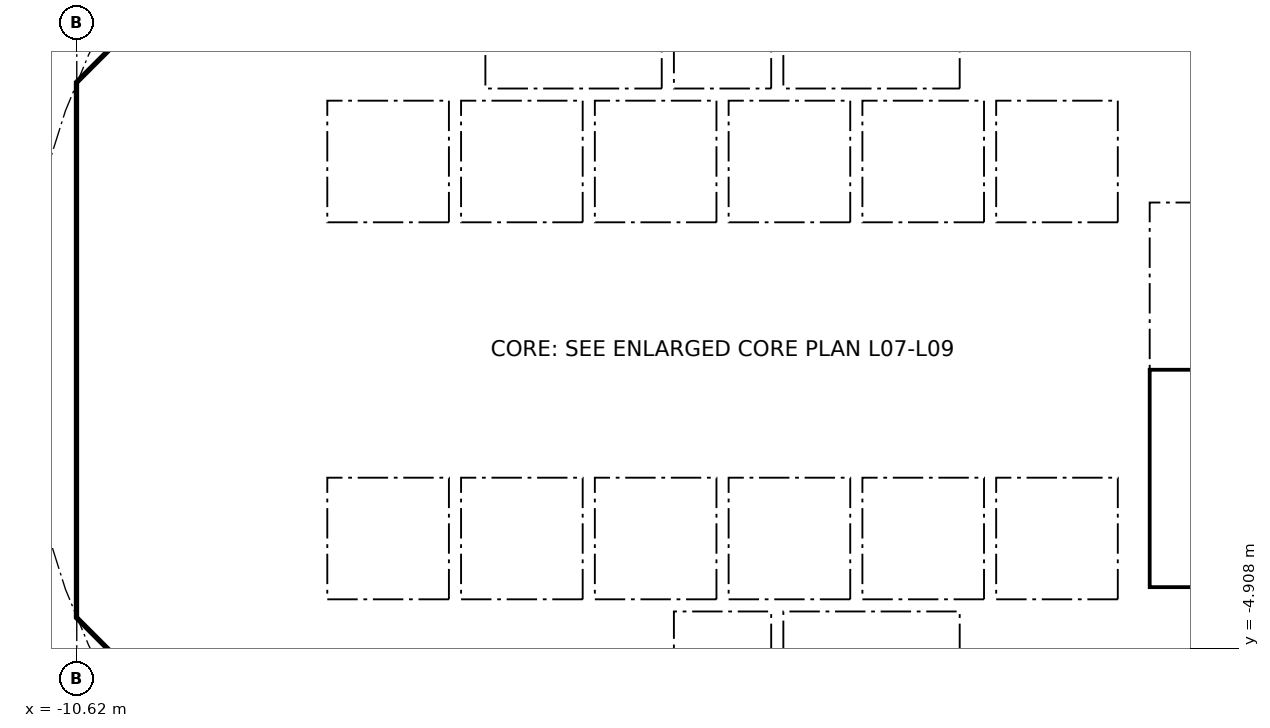
"""IFC4 building model, lengths in metres.
Left out: names, types, materials, properties, quantities, classifications, styles, units other than length and angle.
Written with IfcOpenShell. Run it as: python <this file> out.ifc"""

import sys

from ifc_helpers import new_model, si_unit, direction, frame, frame_2d, origin, place, context, subcontext, project, spatial, polyline, rectangle, outline, extrude, element, fill, save


model = new_model("IFC4")
c1 = context("Model", 3, precision=1e-05, world=origin(), true_north=direction((0.0, 1.0)))
c2 = subcontext(c1, "Body", "Model", "MODEL_VIEW")
j1 = project(units=[si_unit("LENGTHUNIT", "METRE"), si_unit("PLANEANGLEUNIT", "RADIAN")], contexts=[c1])
p1 = place(None, origin())
s1 = spatial("IfcSite", under=j1, at=p1, CompositionType="ELEMENT")
p2 = place(p1, origin())
s2 = spatial("IfcBuilding", under=s1, at=p2, CompositionType="ELEMENT")
p3 = place(p2, frame((0.0, 0.0, 34.4)))
s3 = spatial("IfcBuildingStorey", under=s2, at=p3, CompositionType="ELEMENT", Elevation=34.4)
p4 = place(p3, frame((9.988, 4.613, 0.0), z_axis=(0.0, 0.0, 1.0), x_axis=(-0.707106781187, 0.707106781187, 0.0)))
e1 = element("IfcWall", 1, at=p4, inside=s3, PredefinedType="SHEAR", context=c2, shape_type="SweptSolid", body=[
    extrude(rectangle(XDim=7.602, YDim=0.6, at=frame_2d((3.801, 0.0))), origin(), (0.0, 0.0, 1.0), 3.44),
])
p5 = place(p4, frame((3.201, 0.0, 0.0)))
e2 = element("IfcOpeningElement", 2, at=p5, cuts=e1, PredefinedType="OPENING", context=c2, shape_type="SweptSolid", body=[
    extrude(rectangle(XDim=1.2, YDim=2.1, at=frame_2d((0.6, 1.05))), frame((0.0, 0.31, 0.0), z_axis=(0.0, -1.0, 0.0), x_axis=(1.0, 0.0, 0.0)), (0.0, 0.0, 1.0), 0.62),
])
p6 = place(p3, frame((-4.613, 9.988, 0.0), z_axis=(0.0, 0.0, 1.0), x_axis=(-0.707106781187, -0.707106781187, 0.0)))
e3 = element("IfcWall", 3, at=p6, inside=s3, PredefinedType="SHEAR", context=c2, shape_type="SweptSolid", body=[
    extrude(rectangle(XDim=7.602, YDim=0.6, at=frame_2d((3.801, 0.0))), origin(), (0.0, 0.0, 1.0), 3.44),
])
p7 = place(p6, frame((0.351, 0.0, 0.0)))
e4 = element("IfcOpeningElement", 4, at=p7, cuts=e3, PredefinedType="OPENING", context=c2, shape_type="SweptSolid", body=[
    extrude(rectangle(XDim=1.1, YDim=2.1, at=frame_2d((0.55, 1.05))), frame((0.0, 0.31, 0.0), z_axis=(0.0, -1.0, 0.0), x_axis=(1.0, 0.0, 0.0)), (0.0, 0.0, 1.0), 0.62),
])
p8 = place(p3, frame((-10.325, 3.801, 0.0), z_axis=(0.0, 0.0, 1.0), x_axis=(0.0, -1.0, 0.0)))
e5 = element("IfcWall", 5, at=p8, inside=s3, PredefinedType="SHEAR", context=c2, shape_type="SweptSolid", body=[
    extrude(rectangle(XDim=7.602, YDim=0.6, at=frame_2d((3.801, 0.0))), origin(), (0.0, 0.0, 1.0), 3.44),
])
p9 = place(p8, frame((0.651, 0.0, 0.0)))
e6 = element("IfcOpeningElement", 6, at=p9, cuts=e5, PredefinedType="OPENING", context=c2, shape_type="SweptSolid", body=[
    extrude(rectangle(XDim=1.5, YDim=2.1, at=frame_2d((0.75, 1.05))), frame((0.0, 0.31, 0.0), z_axis=(0.0, -1.0, 0.0), x_axis=(1.0, 0.0, 0.0)), (0.0, 0.0, 1.0), 0.62),
])
p10 = place(p8, frame((5.451, 0.0, 0.0)))
e7 = element("IfcOpeningElement", 7, at=p10, cuts=e5, PredefinedType="OPENING", context=c2, shape_type="SweptSolid", body=[
    extrude(rectangle(XDim=1.5, YDim=2.1, at=frame_2d((0.75, 1.05))), frame((0.0, 0.31, 0.0), z_axis=(0.0, -1.0, 0.0), x_axis=(1.0, 0.0, 0.0)), (0.0, 0.0, 1.0), 0.62),
])
p11 = place(p3, frame((-9.988, -4.613, 0.0), z_axis=(0.0, 0.0, 1.0), x_axis=(0.707106781187, -0.707106781187, 0.0)))
e8 = element("IfcWall", 8, at=p11, inside=s3, PredefinedType="SHEAR", context=c2, shape_type="SweptSolid", body=[
    extrude(rectangle(XDim=7.602, YDim=0.6, at=frame_2d((3.801, 0.0))), origin(), (0.0, 0.0, 1.0), 3.44),
])
p12 = place(p11, frame((6.151, 0.0, 0.0)))
e9 = element("IfcOpeningElement", 9, at=p12, cuts=e8, PredefinedType="OPENING", context=c2, shape_type="SweptSolid", body=[
    extrude(rectangle(XDim=1.1, YDim=2.1, at=frame_2d((0.55, 1.05))), frame((0.0, 0.31, 0.0), z_axis=(0.0, -1.0, 0.0), x_axis=(1.0, 0.0, 0.0)), (0.0, 0.0, 1.0), 0.62),
])
p13 = place(p3, frame((4.613, -9.988, 0.0), z_axis=(0.0, 0.0, 1.0), x_axis=(0.707106781187, 0.707106781187, 0.0)))
e10 = element("IfcWall", 10, at=p13, inside=s3, PredefinedType="SHEAR", context=c2, shape_type="SweptSolid", body=[
    extrude(rectangle(XDim=7.602, YDim=0.6, at=frame_2d((3.801, 0.0))), origin(), (0.0, 0.0, 1.0), 3.44),
])
p14 = place(p13, frame((3.201, 0.0, 0.0)))
e11 = element("IfcOpeningElement", 11, at=p14, cuts=e10, PredefinedType="OPENING", context=c2, shape_type="SweptSolid", body=[
    extrude(rectangle(XDim=1.2, YDim=2.1, at=frame_2d((0.6, 1.05))), frame((0.0, 0.31, 0.0), z_axis=(0.0, -1.0, 0.0), x_axis=(1.0, 0.0, 0.0)), (0.0, 0.0, 1.0), 0.62),
])
p15 = place(p3, frame((-6.2, 4.3, 0.0), z_axis=(0.0, 0.0, 1.0), x_axis=(0.0, 1.0, 0.0)))
e12 = element("IfcWall", 12, at=p15, inside=s3, PredefinedType="PARTITIONING", context=c2, shape_type="SweptSolid", body=[
    extrude(rectangle(XDim=3.527, YDim=0.15, at=frame_2d((1.763, 0.0))), origin(), (0.0, 0.0, 1.0), 3.44),
])
p16 = place(p15, frame((0.262, 0.0, 0.0)))
e13 = element("IfcOpeningElement", 13, at=p16, cuts=e12, PredefinedType="OPENING", context=c2, shape_type="SweptSolid", body=[
    extrude(rectangle(XDim=0.9, YDim=2.1, at=frame_2d((0.45, 1.05))), frame((0.0, 0.085, 0.0), z_axis=(0.0, -1.0, 0.0), x_axis=(1.0, 0.0, 0.0)), (0.0, 0.0, 1.0), 0.17),
])
p17 = place(p15, frame((2.138, 0.0, 0.0)))
e14 = element("IfcOpeningElement", 14, at=p17, cuts=e12, PredefinedType="OPENING", context=c2, shape_type="SweptSolid", body=[
    extrude(rectangle(XDim=0.9, YDim=2.1, at=frame_2d((0.45, 1.05))), frame((0.0, 0.085, 0.0), z_axis=(0.0, -1.0, 0.0), x_axis=(1.0, 0.0, 0.0)), (0.0, 0.0, 1.0), 0.17),
])
p18 = place(p3, frame((4.0, 4.3, 0.0), z_axis=(0.0, 0.0, 1.0), x_axis=(0.0, 1.0, 0.0)))
e15 = element("IfcWall", 15, at=p18, inside=s3, PredefinedType="SOLIDWALL", context=c2, shape_type="SweptSolid", body=[
    extrude(rectangle(XDim=2.2, YDim=0.2, at=frame_2d((1.1, 0.0))), origin(), (0.0, 0.0, 1.0), 3.44),
])
p19 = place(p18, frame((0.55, 0.0, 0.0)))
e16 = element("IfcOpeningElement", 16, at=p19, cuts=e15, PredefinedType="OPENING", context=c2, shape_type="SweptSolid", body=[
    extrude(rectangle(XDim=1.1, YDim=2.1, at=frame_2d((0.55, 1.05))), frame((0.0, 0.11, 0.0), z_axis=(0.0, -1.0, 0.0), x_axis=(1.0, 0.0, 0.0)), (0.0, 0.0, 1.0), 0.22),
])
p20 = place(p3, frame((-4.0, 4.3, 0.0), z_axis=(0.0, 0.0, 1.0), x_axis=(0.0, 1.0, 0.0)))
e17 = element("IfcWall", 17, at=p20, inside=s3, PredefinedType="SOLIDWALL", context=c2, shape_type="SweptSolid", body=[
    extrude(rectangle(XDim=2.2, YDim=0.2, at=frame_2d((1.1, 0.0))), origin(), (0.0, 0.0, 1.0), 3.44),
])
p21 = place(p20, frame((0.55, 0.0, 0.0)))
e18 = element("IfcOpeningElement", 18, at=p21, cuts=e17, PredefinedType="OPENING", context=c2, shape_type="SweptSolid", body=[
    extrude(rectangle(XDim=1.1, YDim=2.1, at=frame_2d((0.55, 1.05))), frame((0.0, 0.11, 0.0), z_axis=(0.0, -1.0, 0.0), x_axis=(1.0, 0.0, 0.0)), (0.0, 0.0, 1.0), 0.22),
])
p22 = place(p3, frame((-6.7, 2.0, 0.0), z_axis=(0.0, 0.0, 1.0), x_axis=(1.0, 0.0, 0.0)))
e19 = element("IfcWall", 19, at=p22, inside=s3, PredefinedType="SOLIDWALL", context=c2, shape_type="SweptSolid", body=[
    extrude(rectangle(XDim=13.4, YDim=0.2, at=frame_2d((6.7, 0.0))), origin(), (0.0, 0.0, 1.0), 3.44),
])
p23 = place(p22, frame((0.65, 0.0, 0.0)))
e20 = element("IfcOpeningElement", 20, at=p23, cuts=e19, PredefinedType="OPENING", context=c2, shape_type="SweptSolid", body=[
    extrude(rectangle(XDim=1.1, YDim=2.1, at=frame_2d((0.55, 1.05))), frame((0.0, 0.11, 0.0), z_axis=(0.0, -1.0, 0.0), x_axis=(1.0, 0.0, 0.0)), (0.0, 0.0, 1.0), 0.22),
])
p24 = place(p22, frame((2.85, 0.0, 0.0)))
e21 = element("IfcOpeningElement", 21, at=p24, cuts=e19, PredefinedType="OPENING", context=c2, shape_type="SweptSolid", body=[
    extrude(rectangle(XDim=1.1, YDim=2.1, at=frame_2d((0.55, 1.05))), frame((0.0, 0.11, 0.0), z_axis=(0.0, -1.0, 0.0), x_axis=(1.0, 0.0, 0.0)), (0.0, 0.0, 1.0), 0.22),
])
p25 = place(p22, frame((5.05, 0.0, 0.0)))
e22 = element("IfcOpeningElement", 22, at=p25, cuts=e19, PredefinedType="OPENING", context=c2, shape_type="SweptSolid", body=[
    extrude(rectangle(XDim=1.1, YDim=2.1, at=frame_2d((0.55, 1.05))), frame((0.0, 0.11, 0.0), z_axis=(0.0, -1.0, 0.0), x_axis=(1.0, 0.0, 0.0)), (0.0, 0.0, 1.0), 0.22),
])
p26 = place(p3, frame((6.7, 4.0, 0.0), z_axis=(0.0, 0.0, 1.0), x_axis=(1.0, 0.0, 0.0)))
e23 = element("IfcWall", 23, at=p26, inside=s3, PredefinedType="SOLIDWALL", context=c2, shape_type="SweptSolid", body=[
    extrude(rectangle(XDim=3.325, YDim=0.2, at=frame_2d((1.662, 0.0))), origin(), (0.0, 0.0, 1.0), 3.44),
])
p27 = place(p26, frame((1.25, 0.0, 0.0)))
e24 = element("IfcOpeningElement", 24, at=p27, cuts=e23, PredefinedType="OPENING", context=c2, shape_type="SweptSolid", body=[
    extrude(rectangle(XDim=1.1, YDim=2.1, at=frame_2d((0.55, 1.05))), frame((0.0, 0.11, 0.0), z_axis=(0.0, -1.0, 0.0), x_axis=(1.0, 0.0, 0.0)), (0.0, 0.0, 1.0), 0.22),
])
p28 = place(p3, frame((-6.2, -7.827, 0.0), z_axis=(0.0, 0.0, 1.0), x_axis=(0.0, 1.0, 0.0)))
e25 = element("IfcWall", 25, at=p28, inside=s3, PredefinedType="PARTITIONING", context=c2, shape_type="SweptSolid", body=[
    extrude(rectangle(XDim=3.527, YDim=0.15, at=frame_2d((1.763, 0.0))), origin(), (0.0, 0.0, 1.0), 3.44),
])
p29 = place(p28, frame((2.365, 0.0, 0.0)))
e26 = element("IfcOpeningElement", 26, at=p29, cuts=e25, PredefinedType="OPENING", context=c2, shape_type="SweptSolid", body=[
    extrude(rectangle(XDim=0.9, YDim=2.1, at=frame_2d((0.45, 1.05))), frame((0.0, 0.085, 0.0), z_axis=(0.0, -1.0, 0.0), x_axis=(1.0, 0.0, 0.0)), (0.0, 0.0, 1.0), 0.17),
])
p30 = place(p28, frame((0.489, 0.0, 0.0)))
e27 = element("IfcOpeningElement", 27, at=p30, cuts=e25, PredefinedType="OPENING", context=c2, shape_type="SweptSolid", body=[
    extrude(rectangle(XDim=0.9, YDim=2.1, at=frame_2d((0.45, 1.05))), frame((0.0, 0.085, 0.0), z_axis=(0.0, -1.0, 0.0), x_axis=(1.0, 0.0, 0.0)), (0.0, 0.0, 1.0), 0.17),
])
p31 = place(p3, frame((4.0, -6.5, 0.0), z_axis=(0.0, 0.0, 1.0), x_axis=(0.0, 1.0, 0.0)))
e28 = element("IfcWall", 28, at=p31, inside=s3, PredefinedType="SOLIDWALL", context=c2, shape_type="SweptSolid", body=[
    extrude(rectangle(XDim=2.2, YDim=0.2, at=frame_2d((1.1, 0.0))), origin(), (0.0, 0.0, 1.0), 3.44),
])
p32 = place(p31, frame((0.55, 0.0, 0.0)))
e29 = element("IfcOpeningElement", 29, at=p32, cuts=e28, PredefinedType="OPENING", context=c2, shape_type="SweptSolid", body=[
    extrude(rectangle(XDim=1.1, YDim=2.1, at=frame_2d((0.55, 1.05))), frame((0.0, 0.11, 0.0), z_axis=(0.0, -1.0, 0.0), x_axis=(1.0, 0.0, 0.0)), (0.0, 0.0, 1.0), 0.22),
])
p33 = place(p3, frame((-4.0, -6.5, 0.0), z_axis=(0.0, 0.0, 1.0), x_axis=(0.0, 1.0, 0.0)))
e30 = element("IfcWall", 30, at=p33, inside=s3, PredefinedType="SOLIDWALL", context=c2, shape_type="SweptSolid", body=[
    extrude(rectangle(XDim=2.2, YDim=0.2, at=frame_2d((1.1, 0.0))), origin(), (0.0, 0.0, 1.0), 3.44),
])
p34 = place(p33, frame((0.65, 0.0, 0.0)))
e31 = element("IfcOpeningElement", 31, at=p34, cuts=e30, PredefinedType="OPENING", context=c2, shape_type="SweptSolid", body=[
    extrude(rectangle(XDim=0.9, YDim=2.1, at=frame_2d((0.45, 1.05))), frame((0.0, 0.11, 0.0), z_axis=(0.0, -1.0, 0.0), x_axis=(1.0, 0.0, 0.0)), (0.0, 0.0, 1.0), 0.22),
])
p35 = place(p3, frame((-6.7, -2.0, 0.0), z_axis=(0.0, 0.0, 1.0), x_axis=(1.0, 0.0, 0.0)))
e32 = element("IfcWall", 32, at=p35, inside=s3, PredefinedType="SOLIDWALL", context=c2, shape_type="SweptSolid", body=[
    extrude(rectangle(XDim=13.4, YDim=0.2, at=frame_2d((6.7, 0.0))), origin(), (0.0, 0.0, 1.0), 3.44),
])
p36 = place(p35, frame((0.65, 0.0, 0.0)))
e33 = element("IfcOpeningElement", 33, at=p36, cuts=e32, PredefinedType="OPENING", context=c2, shape_type="SweptSolid", body=[
    extrude(rectangle(XDim=1.1, YDim=2.1, at=frame_2d((0.55, 1.05))), frame((0.0, 0.11, 0.0), z_axis=(0.0, -1.0, 0.0), x_axis=(1.0, 0.0, 0.0)), (0.0, 0.0, 1.0), 0.22),
])
p37 = place(p35, frame((2.85, 0.0, 0.0)))
e34 = element("IfcOpeningElement", 34, at=p37, cuts=e32, PredefinedType="OPENING", context=c2, shape_type="SweptSolid", body=[
    extrude(rectangle(XDim=1.1, YDim=2.1, at=frame_2d((0.55, 1.05))), frame((0.0, 0.11, 0.0), z_axis=(0.0, -1.0, 0.0), x_axis=(1.0, 0.0, 0.0)), (0.0, 0.0, 1.0), 0.22),
])
p38 = place(p3, origin())
e35 = element("IfcWall", 35, at=p38, inside=s3, PredefinedType="SHEAR", context=c2, shape_type="SweptSolid", body=[
    extrude(outline(polyline([(-10.625, -3.801), (-10.025, -3.801), (-10.025, -4.152), (-9.776, -4.401), (-10.2, -4.825), (-10.625, -4.401), (-10.625, -3.801)])), origin(), (0.0, 0.0, 1.0), 3.44),
])
p39 = place(p3, origin())
e36 = element("IfcWall", 36, at=p39, inside=s3, PredefinedType="SHEAR", context=c2, shape_type="SweptSolid", body=[
    extrude(outline(polyline([(-10.2, 4.825), (-9.776, 4.401), (-10.025, 4.152), (-10.025, 3.801), (-10.625, 3.801), (-10.625, 4.401), (-10.2, 4.825)])), origin(), (0.0, 0.0, 1.0), 3.44),
])
for number, where, z_axis, x_axis in (
    (37, (-10.025, -4.0, 0.0), (0.0, 0.0, 1.0), (1.0, 0.0, 0.0)),
    (38, (-10.025, 4.0, 0.0), (0.0, 0.0, 1.0), (1.0, 0.0, 0.0)),
):
    element("IfcWall", number, at=place(p3, frame(where, z_axis=z_axis, x_axis=x_axis)), inside=s3, PredefinedType="PARTITIONING", context=c2, shape_type="SweptSolid", body=[
        extrude(rectangle(XDim=3.325, YDim=0.2, at=frame_2d((1.662, 0.0))), origin(), (0.0, 0.0, 1.0), 3.44),
    ])
for number, where, z_axis, x_axis in (
    (39, (-0.9, -6.5, 0.0), (0.0, 0.0, 1.0), (0.0, 1.0, 0.0)),
    (40, (0.9, -6.5, 0.0), (0.0, 0.0, 1.0), (0.0, 1.0, 0.0)),
):
    element("IfcWall", number, at=place(p3, frame(where, z_axis=z_axis, x_axis=x_axis)), inside=s3, PredefinedType="SOLIDWALL", context=c2, shape_type="SweptSolid", body=[
        extrude(rectangle(XDim=2.2, YDim=0.2, at=frame_2d((1.1, 0.0))), origin(), (0.0, 0.0, 1.0), 3.44),
    ])
p40 = place(p3, origin())
e41 = element("IfcWall", 41, at=p40, inside=s3, PredefinedType="SOLIDWALL", context=c2, shape_type="SweptSolid", body=[
    extrude(outline(polyline([(-6.7, -2.1), (-6.5, -2.1), (-6.5, -4.1), (-4.5, -4.1), (-4.5, -2.1), (-4.3, -2.1), (-4.3, -4.1), (-2.3, -4.1), (-2.3, -2.1), (-2.1, -2.1), (-2.1, -4.1), (-0.1, -4.1), (-0.1, -2.1), (0.1, -2.1), (0.1, -4.1), (2.1, -4.1), (2.1, -2.1), (2.3, -2.1), (2.3, -4.1), (4.3, -4.1), (4.3, -2.1), (4.5, -2.1), (4.5, -4.1), (6.5, -4.1), (6.5, -2.1), (6.7, -2.1), (6.7, -4.3), (-6.7, -4.3), (-6.7, -2.1)])), origin(), (0.0, 0.0, 1.0), 3.44),
])
for number, where, z_axis, x_axis in (
    (42, (-0.9, 4.3, 0.0), (0.0, 0.0, 1.0), (0.0, 1.0, 0.0)),
    (43, (0.9, 4.3, 0.0), (0.0, 0.0, 1.0), (0.0, 1.0, 0.0)),
):
    element("IfcWall", number, at=place(p3, frame(where, z_axis=z_axis, x_axis=x_axis)), inside=s3, PredefinedType="SOLIDWALL", context=c2, shape_type="SweptSolid", body=[
        extrude(rectangle(XDim=2.2, YDim=0.2, at=frame_2d((1.1, 0.0))), origin(), (0.0, 0.0, 1.0), 3.44),
    ])
p41 = place(p3, origin())
e44 = element("IfcWall", 44, at=p41, inside=s3, PredefinedType="SOLIDWALL", context=c2, shape_type="SweptSolid", body=[
    extrude(outline(polyline([(-6.5, 2.1), (-6.7, 2.1), (-6.7, 4.3), (6.7, 4.3), (6.7, 2.1), (6.5, 2.1), (6.5, 4.1), (4.5, 4.1), (4.5, 2.1), (4.3, 2.1), (4.3, 4.1), (2.3, 4.1), (2.3, 2.1), (2.1, 2.1), (2.1, 4.1), (0.1, 4.1), (0.1, 2.1), (-0.1, 2.1), (-0.1, 4.1), (-2.1, 4.1), (-2.1, 2.1), (-2.3, 2.1), (-2.3, 4.1), (-4.3, 4.1), (-4.3, 2.1), (-4.5, 2.1), (-4.5, 4.1), (-6.5, 4.1), (-6.5, 2.1)])), origin(), (0.0, 0.0, 1.0), 3.44),
])
p42 = place(p3, origin())
e45 = element("IfcWall", 45, at=p42, inside=s3, PredefinedType="SOLIDWALL", context=c2, shape_type="SweptSolid", body=[
    extrude(outline(polyline([(7.025, -3.9), (6.7, -3.9), (6.7, 3.9), (7.025, 3.9), (7.025, -3.9)])), origin(), (0.0, 0.0, 1.0), 3.44),
])
p43 = place(p3, origin())
e46 = element("IfcWall", 46, at=p43, inside=s3, PredefinedType="SOLIDWALL", context=c2, shape_type="SweptSolid", body=[
    extrude(outline(polyline([(10.025, -4.1), (6.7, -4.1), (6.7, -3.9), (10.025, -3.9), (10.025, -4.1)])), origin(), (0.0, 0.0, 1.0), 3.44),
])
p44 = place(p23, origin())
e47 = element("IfcDoor", 47, at=p44, inside=s3, OperationType="DOUBLE_DOOR_SLIDING", PredefinedType="DOOR", context=c2, shape_type="SweptSolid", body=[
    extrude(rectangle(XDim=1.1, YDim=2.1, at=frame_2d((0.55, 1.05))), frame((0.0, 0.025, 0.0), z_axis=(0.0, -1.0, 0.0), x_axis=(1.0, 0.0, 0.0)), (0.0, 0.0, 1.0), 0.05),
])
fill(e20, e47)
p45 = place(p24, origin())
e48 = element("IfcDoor", 48, at=p45, inside=s3, OperationType="DOUBLE_DOOR_SLIDING", PredefinedType="DOOR", context=c2, shape_type="SweptSolid", body=[
    extrude(rectangle(XDim=1.1, YDim=2.1, at=frame_2d((0.55, 1.05))), frame((0.0, 0.025, 0.0), z_axis=(0.0, -1.0, 0.0), x_axis=(1.0, 0.0, 0.0)), (0.0, 0.0, 1.0), 0.05),
])
fill(e21, e48)
p46 = place(p25, origin())
e49 = element("IfcDoor", 49, at=p46, inside=s3, OperationType="DOUBLE_DOOR_SLIDING", PredefinedType="DOOR", context=c2, shape_type="SweptSolid", body=[
    extrude(rectangle(XDim=1.1, YDim=2.1, at=frame_2d((0.55, 1.05))), frame((0.0, 0.025, 0.0), z_axis=(0.0, -1.0, 0.0), x_axis=(1.0, 0.0, 0.0)), (0.0, 0.0, 1.0), 0.05),
])
fill(e22, e49)
p47 = place(p36, origin())
e50 = element("IfcDoor", 50, at=p47, inside=s3, OperationType="DOUBLE_DOOR_SLIDING", PredefinedType="DOOR", context=c2, shape_type="SweptSolid", body=[
    extrude(rectangle(XDim=1.1, YDim=2.1, at=frame_2d((0.55, 1.05))), frame((0.0, 0.025, 0.0), z_axis=(0.0, -1.0, 0.0), x_axis=(1.0, 0.0, 0.0)), (0.0, 0.0, 1.0), 0.05),
])
fill(e33, e50)
p48 = place(p37, origin())
e51 = element("IfcDoor", 51, at=p48, inside=s3, OperationType="DOUBLE_DOOR_SLIDING", PredefinedType="DOOR", context=c2, shape_type="SweptSolid", body=[
    extrude(rectangle(XDim=1.1, YDim=2.1, at=frame_2d((0.55, 1.05))), frame((0.0, 0.025, 0.0), z_axis=(0.0, -1.0, 0.0), x_axis=(1.0, 0.0, 0.0)), (0.0, 0.0, 1.0), 0.05),
])
fill(e34, e51)
p49 = place(p19, origin())
e52 = element("IfcDoor", 52, at=p49, inside=s3, OperationType="DOUBLE_DOOR_SLIDING", PredefinedType="DOOR", context=c2, shape_type="SweptSolid", body=[
    extrude(rectangle(XDim=1.1, YDim=2.1, at=frame_2d((0.55, 1.05))), frame((0.0, 0.025, 0.0), z_axis=(0.0, -1.0, 0.0), x_axis=(1.0, 0.0, 0.0)), (0.0, 0.0, 1.0), 0.05),
])
fill(e16, e52)
p50 = place(p32, origin())
e53 = element("IfcDoor", 53, at=p50, inside=s3, OperationType="DOUBLE_DOOR_SLIDING", PredefinedType="DOOR", context=c2, shape_type="SweptSolid", body=[
    extrude(rectangle(XDim=1.1, YDim=2.1, at=frame_2d((0.55, 1.05))), frame((0.0, 0.025, 0.0), z_axis=(0.0, -1.0, 0.0), x_axis=(1.0, 0.0, 0.0)), (0.0, 0.0, 1.0), 0.05),
])
fill(e29, e53)
p51 = place(p21, origin())
e54 = element("IfcDoor", 54, at=p51, inside=s3, OperationType="DOUBLE_DOOR_SLIDING", PredefinedType="DOOR", context=c2, shape_type="SweptSolid", body=[
    extrude(rectangle(XDim=1.1, YDim=2.1, at=frame_2d((0.55, 1.05))), frame((0.0, 0.025, 0.0), z_axis=(0.0, -1.0, 0.0), x_axis=(1.0, 0.0, 0.0)), (0.0, 0.0, 1.0), 0.05),
])
fill(e18, e54)
p52 = place(p16, origin())
e55 = element("IfcDoor", 55, at=p52, inside=s3, OperationType="SINGLE_SWING_RIGHT", PredefinedType="DOOR", context=c2, shape_type="SweptSolid", body=[
    extrude(rectangle(XDim=0.9, YDim=2.1, at=frame_2d((0.45, 1.05))), frame((0.0, 0.025, 0.0), z_axis=(0.0, -1.0, 0.0), x_axis=(1.0, 0.0, 0.0)), (0.0, 0.0, 1.0), 0.05),
])
fill(e13, e55)
p53 = place(p29, origin())
e56 = element("IfcDoor", 56, at=p53, inside=s3, OperationType="SINGLE_SWING_RIGHT", PredefinedType="DOOR", context=c2, shape_type="SweptSolid", body=[
    extrude(rectangle(XDim=0.9, YDim=2.1, at=frame_2d((0.45, 1.05))), frame((0.0, 0.025, 0.0), z_axis=(0.0, -1.0, 0.0), x_axis=(1.0, 0.0, 0.0)), (0.0, 0.0, 1.0), 0.05),
])
fill(e26, e56)
p54 = place(p9, origin())
e57 = element("IfcDoor", 57, at=p54, inside=s3, OperationType="DOUBLE_DOOR_SINGLE_SWING", PredefinedType="DOOR", context=c2, shape_type="SweptSolid", body=[
    extrude(rectangle(XDim=1.5, YDim=2.1, at=frame_2d((0.75, 1.05))), frame((0.0, 0.025, 0.0), z_axis=(0.0, -1.0, 0.0), x_axis=(1.0, 0.0, 0.0)), (0.0, 0.0, 1.0), 0.05),
])
fill(e6, e57)
p55 = place(p10, origin())
e58 = element("IfcDoor", 58, at=p55, inside=s3, OperationType="DOUBLE_DOOR_SINGLE_SWING", PredefinedType="DOOR", context=c2, shape_type="SweptSolid", body=[
    extrude(rectangle(XDim=1.5, YDim=2.1, at=frame_2d((0.75, 1.05))), frame((0.0, 0.025, 0.0), z_axis=(0.0, -1.0, 0.0), x_axis=(1.0, 0.0, 0.0)), (0.0, 0.0, 1.0), 0.05),
])
fill(e7, e58)
save(model, sys.argv[1])
